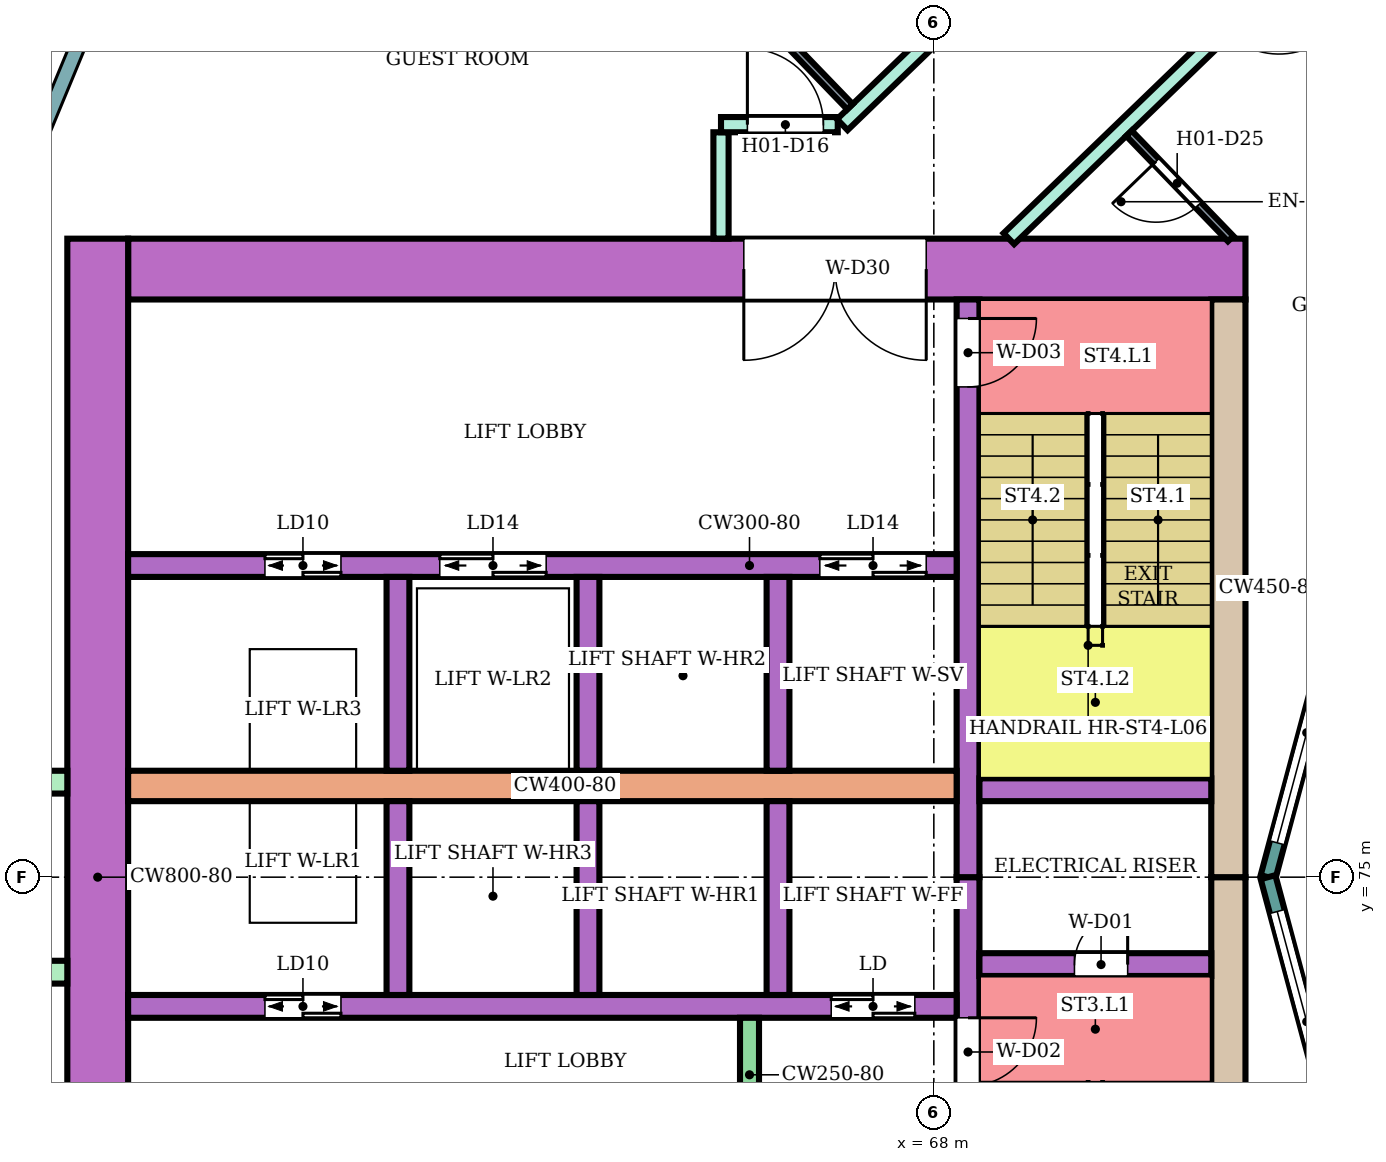
"""IFC4 building model, lengths in metres.
Left out: names, types, materials, properties, quantities, classifications, styles, units other than length and angle.
Written with IfcOpenShell. Run it as: python <this file> out.ifc"""

import sys

from ifc_helpers import new_model, si_unit, direction, frame, frame_2d, origin, place, context, subcontext, project, spatial, rectangle, extrude, element, fill, save


model = new_model("IFC4")
c1 = context("Model", 3, precision=1e-05, world=origin(), true_north=direction((0.0, 1.0)))
c2 = subcontext(c1, "Body", "Model", "MODEL_VIEW")
j1 = project(units=[si_unit("LENGTHUNIT", "METRE"), si_unit("PLANEANGLEUNIT", "RADIAN")], contexts=[c1])
p1 = place(None, origin())
s1 = spatial("IfcSite", under=j1, at=p1, CompositionType="ELEMENT")
p2 = place(p1, origin())
s2 = spatial("IfcBuilding", under=s1, at=p2, CompositionType="ELEMENT")
p3 = place(p2, frame((0.0, 0.0, 32.6)))
s3 = spatial("IfcBuildingStorey", under=s2, at=p3, CompositionType="ELEMENT", Elevation=32.6)
p4 = place(p3, frame((72.1, 83.0, 0.0), z_axis=(0.0, 0.0, 1.0), x_axis=(-1.0, 0.0, 0.0)))
e1 = element("IfcWall", 1, at=p4, inside=s3, PredefinedType="SHEAR", context=c2, shape_type="SweptSolid", body=[
    extrude(rectangle(XDim=14.7, YDim=0.8, at=frame_2d((7.35, 0.0))), origin(), (0.0, 0.0, 1.0), 3.48),
])
p5 = place(p4, frame((4.2, 0.0, 0.0)))
e2 = element("IfcOpeningElement", 2, at=p5, cuts=e1, PredefinedType="OPENING", context=c2, shape_type="SweptSolid", body=[
    extrude(rectangle(XDim=2.4, YDim=2.4, at=frame_2d((1.2, 1.2))), frame((0.0, 0.41, 0.0), z_axis=(0.0, -1.0, 0.0), x_axis=(1.0, 0.0, 0.0)), (0.0, 0.0, 1.0), 0.82),
])
for number, where, z_axis, x_axis in (
    (3, (71.875, 75.0, 0.0), (0.0, 0.0, 1.0), (0.0, -1.0, 0.0)),
    (4, (71.875, 82.6, 0.0), (0.0, 0.0, 1.0), (0.0, -1.0, 0.0)),
):
    element("IfcWall", number, at=place(p3, frame(where, z_axis=z_axis, x_axis=x_axis)), inside=s3, PredefinedType="SHEAR", context=c2, shape_type="SweptSolid", body=[
        extrude(rectangle(XDim=7.6, YDim=0.45, at=frame_2d((3.8, 0.0))), origin(), (0.0, 0.0, 1.0), 3.48),
    ])
p6 = place(p3, frame((57.0, 83.4, 0.0), z_axis=(0.0, 0.0, 1.0), x_axis=(0.0, -1.0, 0.0)))
e5 = element("IfcWall", 5, at=p6, inside=s3, PredefinedType="SHEAR", context=c2, shape_type="SweptSolid", body=[
    extrude(rectangle(XDim=16.8, YDim=0.8, at=frame_2d((8.4, 0.0))), origin(), (0.0, 0.0, 1.0), 3.48),
])
p7 = place(p3, frame((68.45, 75.0, 0.0), z_axis=(0.0, 0.0, 1.0), x_axis=(0.0, -1.0, 0.0)))
e6 = element("IfcWall", 6, at=p7, inside=s3, PredefinedType="SHEAR", context=c2, shape_type="SweptSolid", body=[
    extrude(rectangle(XDim=7.6, YDim=0.3, at=frame_2d((3.8, 0.0))), origin(), (0.0, 0.0, 1.0), 3.48),
])
p8 = place(p7, frame((1.85, 0.0, 0.0)))
e7 = element("IfcOpeningElement", 7, at=p8, cuts=e6, PredefinedType="OPENING", context=c2, shape_type="SweptSolid", body=[
    extrude(rectangle(XDim=0.9, YDim=2.1, at=frame_2d((0.45, 1.05))), frame((0.0, 0.16, 0.0), z_axis=(0.0, -1.0, 0.0), x_axis=(1.0, 0.0, 0.0)), (0.0, 0.0, 1.0), 0.32),
])
p9 = place(p3, frame((68.45, 82.6, 0.0), z_axis=(0.0, 0.0, 1.0), x_axis=(0.0, -1.0, 0.0)))
e8 = element("IfcWall", 8, at=p9, inside=s3, PredefinedType="SHEAR", context=c2, shape_type="SweptSolid", body=[
    extrude(rectangle(XDim=7.6, YDim=0.3, at=frame_2d((3.8, 0.0))), origin(), (0.0, 0.0, 1.0), 3.48),
])
p10 = place(p9, frame((0.25, 0.0, 0.0)))
e9 = element("IfcOpeningElement", 9, at=p10, cuts=e8, PredefinedType="OPENING", context=c2, shape_type="SweptSolid", body=[
    extrude(rectangle(XDim=0.9, YDim=2.1, at=frame_2d((0.45, 1.05))), frame((0.0, 0.16, 0.0), z_axis=(0.0, -1.0, 0.0), x_axis=(1.0, 0.0, 0.0)), (0.0, 0.0, 1.0), 0.32),
])
p11 = place(p3, frame((71.65, 73.85, 0.0), z_axis=(0.0, 0.0, 1.0), x_axis=(-1.0, 0.0, 0.0)))
e10 = element("IfcWall", 10, at=p11, inside=s3, PredefinedType="SHEAR", context=c2, shape_type="SweptSolid", body=[
    extrude(rectangle(XDim=3.05, YDim=0.3, at=frame_2d((1.525, 0.0))), origin(), (0.0, 0.0, 1.0), 3.48),
])
p12 = place(p11, frame((1.1, 0.0, 0.0)))
e11 = element("IfcOpeningElement", 11, at=p12, cuts=e10, PredefinedType="OPENING", context=c2, shape_type="SweptSolid", body=[
    extrude(rectangle(XDim=0.7, YDim=2.0, at=frame_2d((0.35, 1.0))), frame((0.0, 0.16, 0.0), z_axis=(0.0, -1.0, 0.0), x_axis=(1.0, 0.0, 0.0)), (0.0, 0.0, 1.0), 0.32),
])
p13 = place(p3, frame((71.65, 76.15, 0.0), z_axis=(0.0, 0.0, 1.0), x_axis=(-1.0, 0.0, 0.0)))
e12 = element("IfcWall", 12, at=p13, inside=s3, PredefinedType="SHEAR", context=c2, shape_type="SweptSolid", body=[
    extrude(rectangle(XDim=3.05, YDim=0.3, at=frame_2d((1.525, 0.0))), origin(), (0.0, 0.0, 1.0), 3.48),
])
p14 = place(p3, frame((68.3, 73.3, 0.0), z_axis=(0.0, 0.0, 1.0), x_axis=(-1.0, 0.0, 0.0)))
e13 = element("IfcWall", 13, at=p14, inside=s3, PredefinedType="SHEAR", context=c2, shape_type="SweptSolid", body=[
    extrude(rectangle(XDim=10.9, YDim=0.3, at=frame_2d((5.45, 0.0))), origin(), (0.0, 0.0, 1.0), 3.48),
])
p15 = place(p14, frame((0.55, 0.0, 0.0)))
e14 = element("IfcOpeningElement", 14, at=p15, cuts=e13, PredefinedType="OPENING", context=c2, shape_type="SweptSolid", body=[
    extrude(rectangle(XDim=1.1, YDim=2.1, at=frame_2d((0.55, 1.05))), frame((0.0, 0.16, 0.0), z_axis=(0.0, -1.0, 0.0), x_axis=(1.0, 0.0, 0.0)), (0.0, 0.0, 1.0), 0.32),
])
p16 = place(p14, frame((8.1, 0.0, 0.0)))
e15 = element("IfcOpeningElement", 15, at=p16, cuts=e13, PredefinedType="OPENING", context=c2, shape_type="SweptSolid", body=[
    extrude(rectangle(XDim=1.0, YDim=2.1, at=frame_2d((0.5, 1.05))), frame((0.0, 0.16, 0.0), z_axis=(0.0, -1.0, 0.0), x_axis=(1.0, 0.0, 0.0)), (0.0, 0.0, 1.0), 0.32),
])
p17 = place(p3, frame((68.3, 76.2, 0.0), z_axis=(0.0, 0.0, 1.0), x_axis=(-1.0, 0.0, 0.0)))
e16 = element("IfcWall", 16, at=p17, inside=s3, PredefinedType="SHEAR", context=c2, shape_type="SweptSolid", body=[
    extrude(rectangle(XDim=10.9, YDim=0.4, at=frame_2d((5.45, 0.0))), origin(), (0.0, 0.0, 1.0), 3.48),
])
p18 = place(p3, frame((68.3, 79.1, 0.0), z_axis=(0.0, 0.0, 1.0), x_axis=(-1.0, 0.0, 0.0)))
e17 = element("IfcWall", 17, at=p18, inside=s3, PredefinedType="SHEAR", context=c2, shape_type="SweptSolid", body=[
    extrude(rectangle(XDim=10.9, YDim=0.3, at=frame_2d((5.45, 0.0))), origin(), (0.0, 0.0, 1.0), 3.48),
])
p19 = place(p18, frame((0.4, 0.0, 0.0)))
e18 = element("IfcOpeningElement", 18, at=p19, cuts=e17, PredefinedType="OPENING", context=c2, shape_type="SweptSolid", body=[
    extrude(rectangle(XDim=1.4, YDim=2.1, at=frame_2d((0.7, 1.05))), frame((0.0, 0.16, 0.0), z_axis=(0.0, -1.0, 0.0), x_axis=(1.0, 0.0, 0.0)), (0.0, 0.0, 1.0), 0.32),
])
p20 = place(p18, frame((5.4, 0.0, 0.0)))
e19 = element("IfcOpeningElement", 19, at=p20, cuts=e17, PredefinedType="OPENING", context=c2, shape_type="SweptSolid", body=[
    extrude(rectangle(XDim=1.4, YDim=2.1, at=frame_2d((0.7, 1.05))), frame((0.0, 0.16, 0.0), z_axis=(0.0, -1.0, 0.0), x_axis=(1.0, 0.0, 0.0)), (0.0, 0.0, 1.0), 0.32),
])
p21 = place(p18, frame((8.1, 0.0, 0.0)))
e20 = element("IfcOpeningElement", 20, at=p21, cuts=e17, PredefinedType="OPENING", context=c2, shape_type="SweptSolid", body=[
    extrude(rectangle(XDim=1.0, YDim=2.1, at=frame_2d((0.5, 1.05))), frame((0.0, 0.16, 0.0), z_axis=(0.0, -1.0, 0.0), x_axis=(1.0, 0.0, 0.0)), (0.0, 0.0, 1.0), 0.32),
])
for number, where, z_axis, x_axis in (
    (21, (65.95, 76.0, 0.0), (0.0, 0.0, 1.0), (0.0, -1.0, 0.0)),
    (22, (63.45, 76.0, 0.0), (0.0, 0.0, 1.0), (0.0, -1.0, 0.0)),
    (23, (60.95, 76.0, 0.0), (0.0, 0.0, 1.0), (0.0, -1.0, 0.0)),
    (24, (65.95, 78.95, 0.0), (0.0, 0.0, 1.0), (0.0, -1.0, 0.0)),
    (25, (63.45, 78.95, 0.0), (0.0, 0.0, 1.0), (0.0, -1.0, 0.0)),
    (26, (60.95, 78.95, 0.0), (0.0, 0.0, 1.0), (0.0, -1.0, 0.0)),
):
    element("IfcWall", number, at=place(p3, frame(where, z_axis=z_axis, x_axis=x_axis)), inside=s3, PredefinedType="SHEAR", context=c2, shape_type="SweptSolid", body=[
        extrude(rectangle(XDim=2.55, YDim=0.3, at=frame_2d((1.275, 0.0))), origin(), (0.0, 0.0, 1.0), 3.48),
    ])
p22 = place(p3, frame((65.575, 73.15, 0.0), z_axis=(0.0, 0.0, 1.0), x_axis=(0.0, -1.0, 0.0)))
e27 = element("IfcWall", 27, at=p22, inside=s3, PredefinedType="SHEAR", context=c2, shape_type="SweptSolid", body=[
    extrude(rectangle(XDim=1.5, YDim=0.25, at=frame_2d((0.75, 0.0))), origin(), (0.0, 0.0, 1.0), 3.48),
])
for number, where, z_axis, x_axis in (
    (28, (56.6, 76.25, 0.0), (0.0, 0.0, 1.0), (-1.0, 0.0, 0.0)),
    (29, (56.6, 73.75, 0.0), (0.0, 0.0, 1.0), (-1.0, 0.0, 0.0)),
):
    element("IfcWall", number, at=place(p3, frame(where, z_axis=z_axis, x_axis=x_axis)), inside=s3, PredefinedType="NOTDEFINED", context=c2, shape_type="SweptSolid", body=[
        extrude(rectangle(XDim=2.416, YDim=0.3, at=frame_2d((1.208, 0.0))), origin(), (0.0, 0.0, 1.0), 3.8),
    ])
p23 = place(p3, frame((73.415, 78.802, 0.0), z_axis=(0.0, 0.0, 1.0), x_axis=(-0.258789828301, -0.965933654434, 0.0)))
e30 = element("IfcWall", 30, at=p23, inside=s3, PredefinedType="NOTDEFINED", context=c2, shape_type="SweptSolid", body=[
    extrude(rectangle(XDim=3.936, YDim=0.2, at=frame_2d((1.968, 0.0))), origin(), (0.0, 0.0, 1.0), 3.8),
])
p24 = place(p23, frame((0.468, 0.0, 0.9)))
e31 = element("IfcOpeningElement", 31, at=p24, cuts=e30, PredefinedType="OPENING", context=c2, shape_type="SweptSolid", body=[
    extrude(rectangle(XDim=3.0, YDim=2.3, at=frame_2d((1.5, 1.15))), frame((0.0, 0.11, 0.0), z_axis=(0.0, -1.0, 0.0), x_axis=(1.0, 0.0, 0.0)), (0.0, 0.0, 1.0), 0.22),
])
p25 = place(p3, frame((72.396, 75.0, 0.0), z_axis=(0.0, 0.0, 1.0), x_axis=(0.258789828301, -0.965933654434, 0.0)))
e32 = element("IfcWall", 32, at=p25, inside=s3, PredefinedType="NOTDEFINED", context=c2, shape_type="SweptSolid", body=[
    extrude(rectangle(XDim=3.936, YDim=0.2, at=frame_2d((1.968, 0.0))), origin(), (0.0, 0.0, 1.0), 3.8),
])
p26 = place(p25, frame((0.468, 0.0, 0.9)))
e33 = element("IfcOpeningElement", 33, at=p26, cuts=e32, PredefinedType="OPENING", context=c2, shape_type="SweptSolid", body=[
    extrude(rectangle(XDim=3.0, YDim=2.3, at=frame_2d((1.5, 1.15))), frame((0.0, 0.11, 0.0), z_axis=(0.0, -1.0, 0.0), x_axis=(1.0, 0.0, 0.0)), (0.0, 0.0, 1.0), 0.22),
])
p27 = place(p3, frame((65.2, 83.401, 0.0), z_axis=(0.0, 0.0, 1.0), x_axis=(0.0, 1.0, 0.0)))
e34 = element("IfcWall", 34, at=p27, inside=s3, PredefinedType="PARTITIONING", context=c2, shape_type="SweptSolid", body=[
    extrude(rectangle(XDim=1.399, YDim=0.2, at=frame_2d((0.7, 0.0))), origin(), (0.0, 0.0, 1.0), 3.35),
])
p28 = place(p3, frame((65.2, 84.9, 0.0), z_axis=(0.0, 0.0, 1.0), x_axis=(1.0, 0.0, 0.0)))
e35 = element("IfcWall", 35, at=p28, inside=s3, PredefinedType="PARTITIONING", context=c2, shape_type="SweptSolid", body=[
    extrude(rectangle(XDim=1.536, YDim=0.2, at=frame_2d((0.768, 0.0))), origin(), (0.0, 0.0, 1.0), 3.35),
])
p29 = place(p28, frame((0.347, 0.0, 0.0)))
e36 = element("IfcOpeningElement", 36, at=p29, cuts=e35, PredefinedType="OPENING", context=c2, shape_type="SweptSolid", body=[
    extrude(rectangle(XDim=1.0, YDim=2.1, at=frame_2d((0.5, 1.05))), frame((0.0, 0.11, 0.0), z_axis=(0.0, -1.0, 0.0), x_axis=(1.0, 0.0, 0.0)), (0.0, 0.0, 1.0), 0.22),
])
p30 = place(p3, frame((66.796, 84.9, 0.0), z_axis=(0.0, 0.0, 1.0), x_axis=(0.719690131178, 0.694295409092, 0.0)))
e37 = element("IfcWall", 37, at=p30, inside=s3, PredefinedType="PARTITIONING", context=c2, shape_type="SweptSolid", body=[
    extrude(rectangle(XDim=6.585, YDim=0.2, at=frame_2d((3.293, 0.0))), origin(), (0.0, 0.0, 1.0), 3.35),
])
p31 = place(p30, frame((2.867, 0.0, 0.0)))
e38 = element("IfcOpeningElement", 38, at=p31, cuts=e37, PredefinedType="OPENING", context=c2, shape_type="SweptSolid", body=[
    extrude(rectangle(XDim=1.0, YDim=2.1, at=frame_2d((0.5, 1.05))), frame((0.0, 0.11, 0.0), z_axis=(0.0, -1.0, 0.0), x_axis=(1.0, 0.0, 0.0)), (0.0, 0.0, 1.0), 0.22),
])
p32 = place(p3, frame((68.987, 83.4, 0.0), z_axis=(0.0, 0.0, 1.0), x_axis=(0.719591503389, 0.694397629784, 0.0)))
e39 = element("IfcWall", 39, at=p32, inside=s3, PredefinedType="PARTITIONING", context=c2, shape_type="SweptSolid", body=[
    extrude(rectangle(XDim=5.378, YDim=0.2, at=frame_2d((2.689, 0.0))), origin(), (0.0, 0.0, 1.0), 3.35),
])
p33 = place(p32, frame((3.938, 0.0, 0.0)))
e40 = element("IfcOpeningElement", 40, at=p33, cuts=e39, PredefinedType="OPENING", context=c2, shape_type="SweptSolid", body=[
    extrude(rectangle(XDim=1.0, YDim=2.1, at=frame_2d((0.5, 1.05))), frame((0.0, 0.11, 0.0), z_axis=(0.0, -1.0, 0.0), x_axis=(1.0, 0.0, 0.0)), (0.0, 0.0, 1.0), 0.22),
])
p34 = place(p3, frame((72.948, 87.214, 0.0), z_axis=(0.0, 0.0, 1.0), x_axis=(0.499943524694, -0.866058007363, 0.0)))
e41 = element("IfcWall", 41, at=p34, inside=s3, PredefinedType="PARTITIONING", context=c2, shape_type="SweptSolid", body=[
    extrude(rectangle(XDim=6.405, YDim=0.2, at=frame_2d((3.203, 0.0))), origin(), (0.0, 0.0, 1.0), 3.35),
])
p35 = place(p3, frame((65.022, 87.079, 0.0), z_axis=(0.0, 0.0, 1.0), x_axis=(0.694287838235, -0.719697434815, 0.0)))
e42 = element("IfcWall", 42, at=p35, inside=s3, PredefinedType="PARTITIONING", context=c2, shape_type="SweptSolid", body=[
    extrude(rectangle(XDim=2.7, YDim=0.1, at=frame_2d((1.35, 0.0))), origin(), (0.0, 0.0, 1.0), 3.35),
])
p36 = place(p35, frame((0.85, 0.0, 0.0)))
e43 = element("IfcOpeningElement", 43, at=p36, cuts=e42, PredefinedType="OPENING", context=c2, shape_type="SweptSolid", body=[
    extrude(rectangle(XDim=0.8, YDim=2.1, at=frame_2d((0.4, 1.05))), frame((0.0, 0.06, 0.0), z_axis=(0.0, -1.0, 0.0), x_axis=(1.0, 0.0, 0.0)), (0.0, 0.0, 1.0), 0.12),
])
p37 = place(p3, frame((70.567, 84.786, 0.0), z_axis=(0.0, 0.0, 1.0), x_axis=(0.694447472534, -0.719543402368, 0.0)))
e44 = element("IfcWall", 44, at=p37, inside=s3, PredefinedType="PARTITIONING", context=c2, shape_type="SweptSolid", body=[
    extrude(rectangle(XDim=1.926, YDim=0.1, at=frame_2d((0.963, 0.0))), origin(), (0.0, 0.0, 1.0), 3.35),
])
p38 = place(p37, frame((0.513, 0.0, 0.0)))
e45 = element("IfcOpeningElement", 45, at=p38, cuts=e44, PredefinedType="OPENING", context=c2, shape_type="SweptSolid", body=[
    extrude(rectangle(XDim=0.8, YDim=2.1, at=frame_2d((0.4, 1.05))), frame((0.0, 0.06, 0.0), z_axis=(0.0, -1.0, 0.0), x_axis=(1.0, 0.0, 0.0)), (0.0, 0.0, 1.0), 0.12),
])
p39 = place(p24, origin())
e46 = element("IfcWindow", 46, at=p39, inside=s3, PartitioningType="SINGLE_PANEL", PredefinedType="WINDOW", context=c2, shape_type="SweptSolid", body=[
    extrude(rectangle(XDim=3.0, YDim=2.3, at=frame_2d((1.5, 1.15))), frame((0.0, 0.03, 0.0), z_axis=(0.0, -1.0, 0.0), x_axis=(1.0, 0.0, 0.0)), (0.0, 0.0, 1.0), 0.06),
])
fill(e31, e46)
p40 = place(p26, origin())
e47 = element("IfcWindow", 47, at=p40, inside=s3, PartitioningType="SINGLE_PANEL", PredefinedType="WINDOW", context=c2, shape_type="SweptSolid", body=[
    extrude(rectangle(XDim=3.0, YDim=2.3, at=frame_2d((1.5, 1.15))), frame((0.0, 0.03, 0.0), z_axis=(0.0, -1.0, 0.0), x_axis=(1.0, 0.0, 0.0)), (0.0, 0.0, 1.0), 0.06),
])
fill(e33, e47)
p41 = place(p29, origin())
e48 = element("IfcDoor", 48, at=p41, inside=s3, OperationType="SINGLE_SWING_LEFT", PredefinedType="DOOR", context=c2, shape_type="SweptSolid", body=[
    extrude(rectangle(XDim=1.0, YDim=2.1, at=frame_2d((0.5, 1.05))), frame((0.0, 0.025, 0.0), z_axis=(0.0, -1.0, 0.0), x_axis=(1.0, 0.0, 0.0)), (0.0, 0.0, 1.0), 0.05),
])
fill(e36, e48)
p42 = place(p38, frame((0.8, 0.0, 0.0), z_axis=(0.0, 0.0, 1.0), x_axis=(-1.0, 0.0, 0.0)))
e49 = element("IfcDoor", 49, at=p42, inside=s3, OperationType="SINGLE_SWING_RIGHT", PredefinedType="DOOR", context=c2, shape_type="SweptSolid", body=[
    extrude(rectangle(XDim=0.8, YDim=2.1, at=frame_2d((0.4, 1.05))), frame((0.0, 0.025, 0.0), z_axis=(0.0, -1.0, 0.0), x_axis=(1.0, 0.0, 0.0)), (0.0, 0.0, 1.0), 0.05),
])
fill(e45, e49)
p43 = place(p12, frame((0.7, 0.0, 0.0), z_axis=(0.0, 0.0, 1.0), x_axis=(-1.0, 0.0, 0.0)))
e50 = element("IfcDoor", 50, at=p43, inside=s3, OperationType="SINGLE_SWING_RIGHT", PredefinedType="DOOR", context=c2, shape_type="SweptSolid", body=[
    extrude(rectangle(XDim=0.7, YDim=2.0, at=frame_2d((0.35, 1.0))), frame((0.0, 0.025, 0.0), z_axis=(0.0, -1.0, 0.0), x_axis=(1.0, 0.0, 0.0)), (0.0, 0.0, 1.0), 0.05),
])
fill(e11, e50)
p44 = place(p8, origin())
e51 = element("IfcDoor", 51, at=p44, inside=s3, OperationType="SINGLE_SWING_LEFT", PredefinedType="DOOR", context=c2, shape_type="SweptSolid", body=[
    extrude(rectangle(XDim=0.9, YDim=2.1, at=frame_2d((0.45, 1.05))), frame((0.0, 0.025, 0.0), z_axis=(0.0, -1.0, 0.0), x_axis=(1.0, 0.0, 0.0)), (0.0, 0.0, 1.0), 0.05),
])
fill(e7, e51)
p45 = place(p10, origin())
e52 = element("IfcDoor", 52, at=p45, inside=s3, OperationType="SINGLE_SWING_LEFT", PredefinedType="DOOR", context=c2, shape_type="SweptSolid", body=[
    extrude(rectangle(XDim=0.9, YDim=2.1, at=frame_2d((0.45, 1.05))), frame((0.0, 0.025, 0.0), z_axis=(0.0, -1.0, 0.0), x_axis=(1.0, 0.0, 0.0)), (0.0, 0.0, 1.0), 0.05),
])
fill(e9, e52)
p46 = place(p15, origin())
e53 = element("IfcDoor", 53, at=p46, inside=s3, OperationType="DOUBLE_DOOR_SLIDING", PredefinedType="DOOR", context=c2, shape_type="SweptSolid", body=[
    extrude(rectangle(XDim=1.1, YDim=2.1, at=frame_2d((0.55, 1.05))), frame((0.0, 0.025, 0.0), z_axis=(0.0, -1.0, 0.0), x_axis=(1.0, 0.0, 0.0)), (0.0, 0.0, 1.0), 0.05),
])
fill(e14, e53)
p47 = place(p16, origin())
e54 = element("IfcDoor", 54, at=p47, inside=s3, OperationType="DOUBLE_DOOR_SLIDING", PredefinedType="DOOR", context=c2, shape_type="SweptSolid", body=[
    extrude(rectangle(XDim=1.0, YDim=2.1, at=frame_2d((0.5, 1.05))), frame((0.0, 0.025, 0.0), z_axis=(0.0, -1.0, 0.0), x_axis=(1.0, 0.0, 0.0)), (0.0, 0.0, 1.0), 0.05),
])
fill(e15, e54)
p48 = place(p19, origin())
e55 = element("IfcDoor", 55, at=p48, inside=s3, OperationType="DOUBLE_DOOR_SLIDING", PredefinedType="DOOR", context=c2, shape_type="SweptSolid", body=[
    extrude(rectangle(XDim=1.4, YDim=2.1, at=frame_2d((0.7, 1.05))), frame((0.0, 0.025, 0.0), z_axis=(0.0, -1.0, 0.0), x_axis=(1.0, 0.0, 0.0)), (0.0, 0.0, 1.0), 0.05),
])
fill(e18, e55)
p49 = place(p20, origin())
e56 = element("IfcDoor", 56, at=p49, inside=s3, OperationType="DOUBLE_DOOR_SLIDING", PredefinedType="DOOR", context=c2, shape_type="SweptSolid", body=[
    extrude(rectangle(XDim=1.4, YDim=2.1, at=frame_2d((0.7, 1.05))), frame((0.0, 0.025, 0.0), z_axis=(0.0, -1.0, 0.0), x_axis=(1.0, 0.0, 0.0)), (0.0, 0.0, 1.0), 0.05),
])
fill(e19, e56)
p50 = place(p21, origin())
e57 = element("IfcDoor", 57, at=p50, inside=s3, OperationType="DOUBLE_DOOR_SLIDING", PredefinedType="DOOR", context=c2, shape_type="SweptSolid", body=[
    extrude(rectangle(XDim=1.0, YDim=2.1, at=frame_2d((0.5, 1.05))), frame((0.0, 0.025, 0.0), z_axis=(0.0, -1.0, 0.0), x_axis=(1.0, 0.0, 0.0)), (0.0, 0.0, 1.0), 0.05),
])
fill(e20, e57)
p51 = place(p5, origin())
e58 = element("IfcDoor", 58, at=p51, inside=s3, OperationType="DOUBLE_DOOR_SINGLE_SWING", PredefinedType="DOOR", context=c2, shape_type="SweptSolid", body=[
    extrude(rectangle(XDim=2.4, YDim=2.4, at=frame_2d((1.2, 1.2))), frame((0.0, 0.025, 0.0), z_axis=(0.0, -1.0, 0.0), x_axis=(1.0, 0.0, 0.0)), (0.0, 0.0, 1.0), 0.05),
])
fill(e2, e58)
save(model, sys.argv[1])
